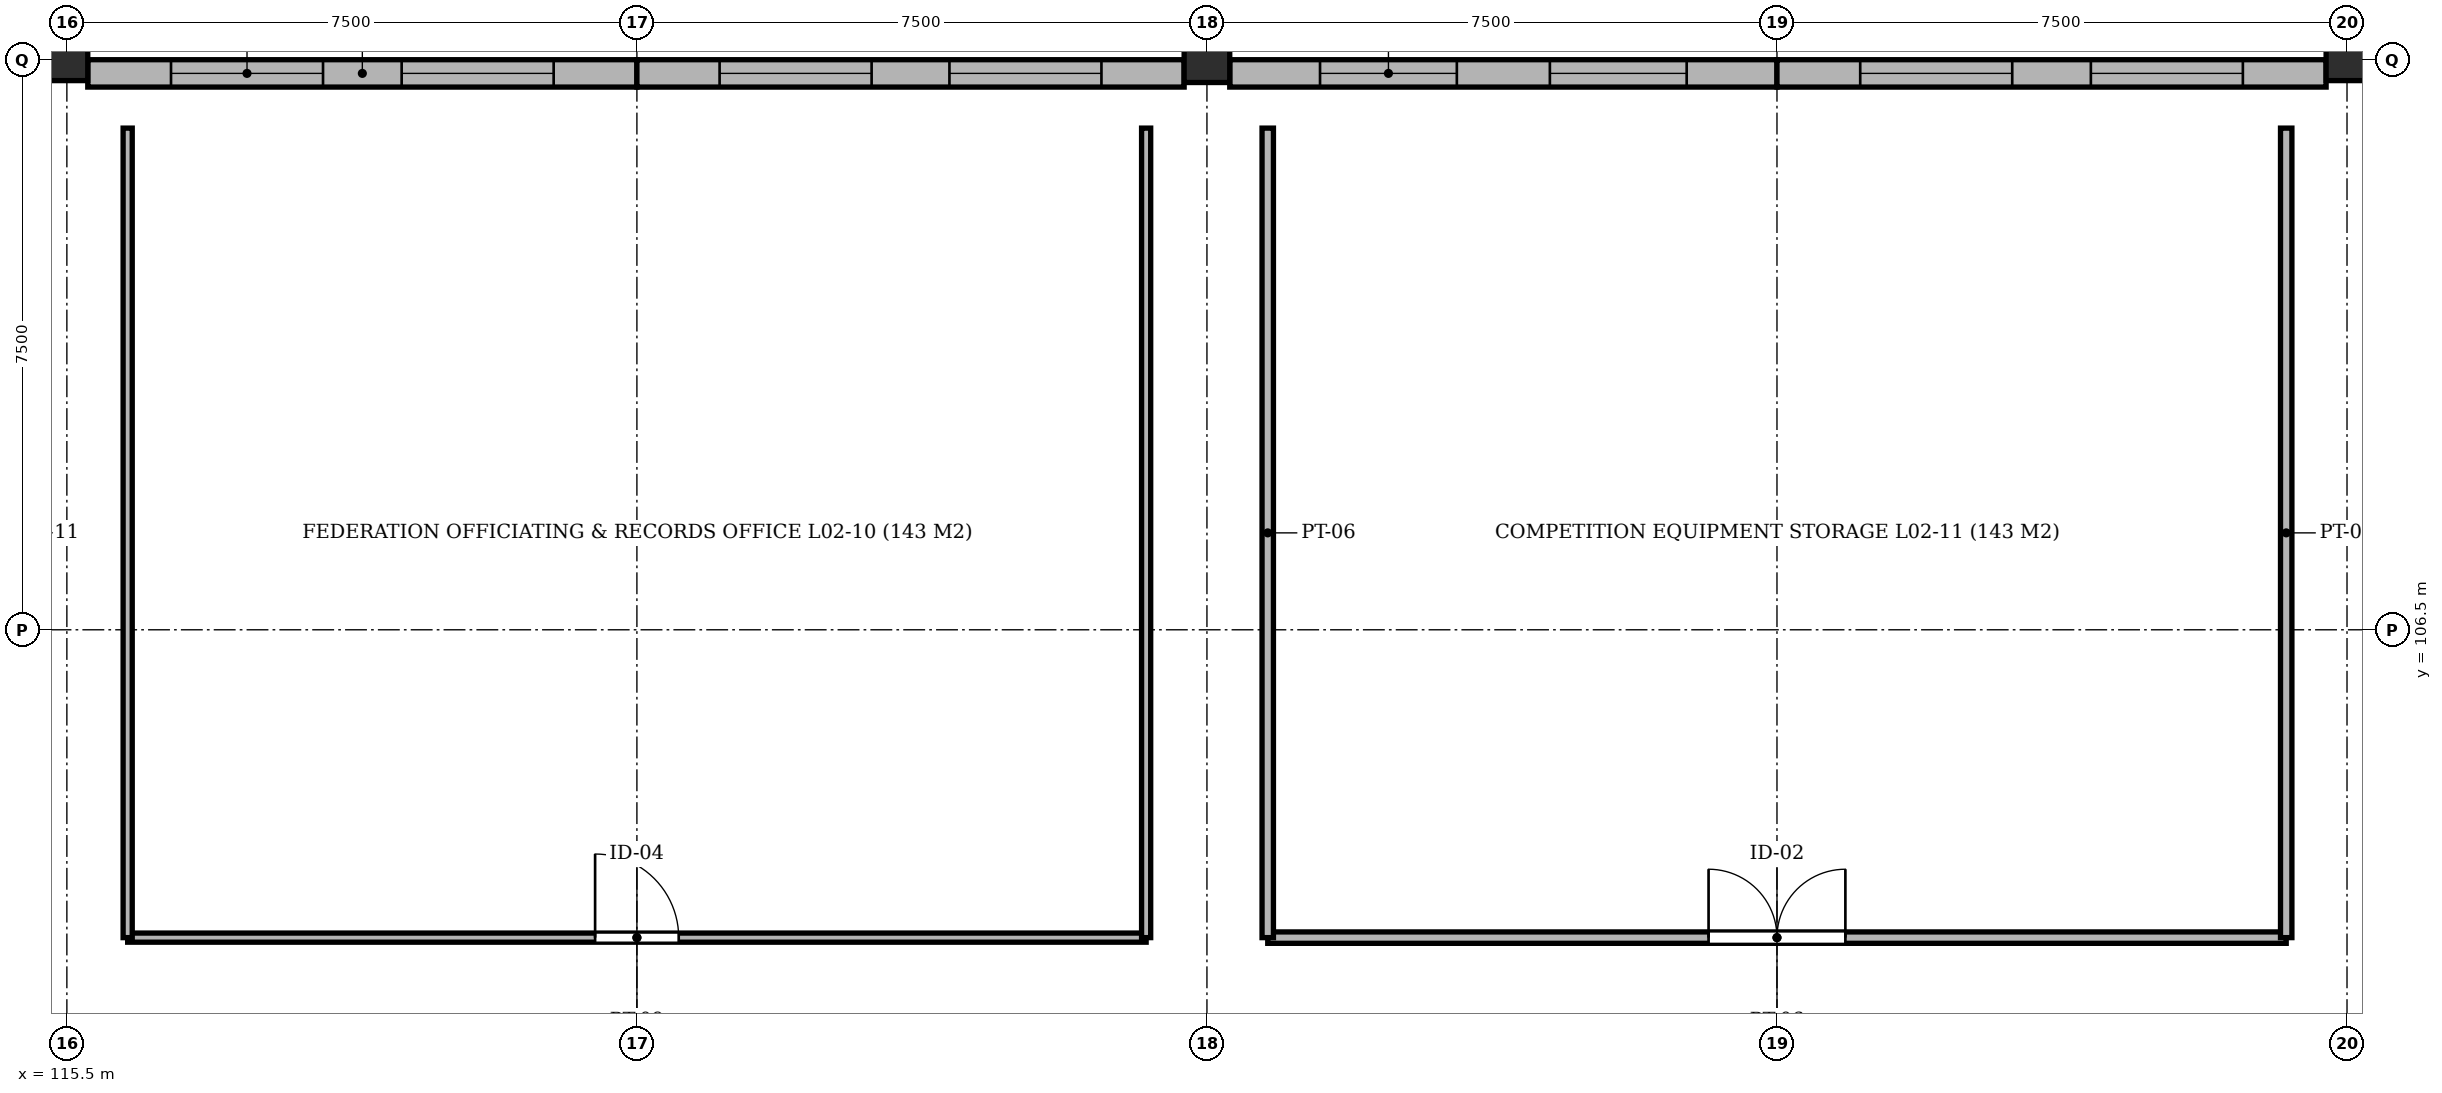
"""IFC4 building model, lengths in metres.
Left out: names, types, materials, properties, quantities, classifications, styles, units other than length and angle.
Written with IfcOpenShell. Run it as: python <this file> out.ifc"""

import sys

from ifc_helpers import new_model, si_unit, direction, frame, frame_2d, origin, origin_2d, place, context, subcontext, project, spatial, rectangle, extrude, element, fill, save


model = new_model("IFC4")
c1 = context("Model", 3, precision=1e-05, world=origin(), true_north=direction((0.0, 1.0)))
c2 = subcontext(c1, "Body", "Model", "MODEL_VIEW")
j1 = project(units=[si_unit("LENGTHUNIT", "METRE"), si_unit("PLANEANGLEUNIT", "RADIAN")], contexts=[c1])
p1 = place(None, origin())
s1 = spatial("IfcSite", under=j1, at=p1, CompositionType="ELEMENT")
p2 = place(p1, origin())
s2 = spatial("IfcBuilding", under=s1, at=p2, CompositionType="ELEMENT")
p3 = place(p2, frame((0.0, 0.0, 9.4)))
s3 = spatial("IfcBuildingStorey", under=s2, at=p3, CompositionType="ELEMENT", Elevation=9.4)
p4 = place(p3, frame((115.5, 114.0, -0.45), z_axis=(0.0, 0.0, 1.0), x_axis=(1.0, 0.0, 0.0)))
e1 = element("IfcColumn", 1, at=p4, inside=s3, PredefinedType="COLUMN", context=c2, shape_type="SweptSolid", body=[
    extrude(rectangle(XDim=0.55, YDim=0.55, at=origin_2d()), origin(), (0.0, 0.0, 1.0), 4.77),
])
p5 = place(p3, frame((130.5, 114.0, -0.45), z_axis=(0.0, 0.0, 1.0), x_axis=(1.0, 0.0, 0.0)))
e2 = element("IfcColumn", 2, at=p5, inside=s3, PredefinedType="COLUMN", context=c2, shape_type="SweptSolid", body=[
    extrude(rectangle(XDim=0.6, YDim=0.6, at=origin_2d()), origin(), (0.0, 0.0, 1.0), 4.77),
])
p6 = place(p3, frame((145.5, 114.0, -0.45), z_axis=(0.0, 0.0, 1.0), x_axis=(1.0, 0.0, 0.0)))
e3 = element("IfcColumn", 3, at=p6, inside=s3, PredefinedType="COLUMN", context=c2, shape_type="SweptSolid", body=[
    extrude(rectangle(XDim=0.55, YDim=0.55, at=origin_2d()), origin(), (0.0, 0.0, 1.0), 4.77),
])
p7 = place(p3, frame((123.0, 113.82, 0.0), z_axis=(0.0, 0.0, 1.0), x_axis=(-1.0, 0.0, 0.0)))
e4 = element("IfcWall", 4, at=p7, inside=s3, PredefinedType="SOLIDWALL", context=c2, shape_type="SweptSolid", body=[
    extrude(rectangle(XDim=7.225, YDim=0.36, at=frame_2d((3.613, 0.0))), origin(), (0.0, 0.0, 1.0), 3.45),
])
p8 = place(p7, frame((4.13, 0.0, 0.92)))
e5 = element("IfcOpeningElement", 5, at=p8, cuts=e4, PredefinedType="OPENING", context=c2, shape_type="SweptSolid", body=[
    extrude(rectangle(XDim=2.0, YDim=2.1, at=frame_2d((1.0, 1.05))), frame((0.0, 0.192, 0.0), z_axis=(0.0, -1.0, 0.0), x_axis=(1.0, 0.0, 0.0)), (0.0, 0.0, 1.0), 0.384),
])
p9 = place(p7, frame((1.095, 0.0, 0.92)))
e6 = element("IfcOpeningElement", 6, at=p9, cuts=e4, PredefinedType="OPENING", context=c2, shape_type="SweptSolid", body=[
    extrude(rectangle(XDim=2.0, YDim=2.1, at=frame_2d((1.0, 1.05))), frame((0.0, 0.192, 0.0), z_axis=(0.0, -1.0, 0.0), x_axis=(1.0, 0.0, 0.0)), (0.0, 0.0, 1.0), 0.384),
])
p10 = place(p3, frame((130.2, 113.82, 0.0), z_axis=(0.0, 0.0, 1.0), x_axis=(-1.0, 0.0, 0.0)))
e7 = element("IfcWall", 7, at=p10, inside=s3, PredefinedType="SOLIDWALL", context=c2, shape_type="SweptSolid", body=[
    extrude(rectangle(XDim=7.2, YDim=0.36, at=frame_2d((3.6, 0.0))), origin(), (0.0, 0.0, 1.0), 3.45),
])
p11 = place(p10, frame((4.112, 0.0, 0.92)))
e8 = element("IfcOpeningElement", 8, at=p11, cuts=e7, PredefinedType="OPENING", context=c2, shape_type="SweptSolid", body=[
    extrude(rectangle(XDim=2.0, YDim=2.1, at=frame_2d((1.0, 1.05))), frame((0.0, 0.192, 0.0), z_axis=(0.0, -1.0, 0.0), x_axis=(1.0, 0.0, 0.0)), (0.0, 0.0, 1.0), 0.384),
])
p12 = place(p10, frame((1.088, 0.0, 0.92)))
e9 = element("IfcOpeningElement", 9, at=p12, cuts=e7, PredefinedType="OPENING", context=c2, shape_type="SweptSolid", body=[
    extrude(rectangle(XDim=2.0, YDim=2.1, at=frame_2d((1.0, 1.05))), frame((0.0, 0.192, 0.0), z_axis=(0.0, -1.0, 0.0), x_axis=(1.0, 0.0, 0.0)), (0.0, 0.0, 1.0), 0.384),
])
p13 = place(p3, frame((138.0, 113.82, 0.0), z_axis=(0.0, 0.0, 1.0), x_axis=(-1.0, 0.0, 0.0)))
e10 = element("IfcWall", 10, at=p13, inside=s3, PredefinedType="SOLIDWALL", context=c2, shape_type="SweptSolid", body=[
    extrude(rectangle(XDim=7.2, YDim=0.36, at=frame_2d((3.6, 0.0))), origin(), (0.0, 0.0, 1.0), 3.45),
])
p14 = place(p13, frame((4.212, 0.0, 0.92)))
e11 = element("IfcOpeningElement", 11, at=p14, cuts=e10, PredefinedType="OPENING", context=c2, shape_type="SweptSolid", body=[
    extrude(rectangle(XDim=1.8, YDim=2.1, at=frame_2d((0.9, 1.05))), frame((0.0, 0.192, 0.0), z_axis=(0.0, -1.0, 0.0), x_axis=(1.0, 0.0, 0.0)), (0.0, 0.0, 1.0), 0.384),
])
p15 = place(p13, frame((1.188, 0.0, 0.92)))
e12 = element("IfcOpeningElement", 12, at=p15, cuts=e10, PredefinedType="OPENING", context=c2, shape_type="SweptSolid", body=[
    extrude(rectangle(XDim=1.8, YDim=2.1, at=frame_2d((0.9, 1.05))), frame((0.0, 0.192, 0.0), z_axis=(0.0, -1.0, 0.0), x_axis=(1.0, 0.0, 0.0)), (0.0, 0.0, 1.0), 0.384),
])
p16 = place(p3, frame((145.225, 113.82, 0.0), z_axis=(0.0, 0.0, 1.0), x_axis=(-1.0, 0.0, 0.0)))
e13 = element("IfcWall", 13, at=p16, inside=s3, PredefinedType="SOLIDWALL", context=c2, shape_type="SweptSolid", body=[
    extrude(rectangle(XDim=7.225, YDim=0.36, at=frame_2d((3.613, 0.0))), origin(), (0.0, 0.0, 1.0), 3.45),
])
p17 = place(p16, frame((4.13, 0.0, 0.92)))
e14 = element("IfcOpeningElement", 14, at=p17, cuts=e13, PredefinedType="OPENING", context=c2, shape_type="SweptSolid", body=[
    extrude(rectangle(XDim=2.0, YDim=2.1, at=frame_2d((1.0, 1.05))), frame((0.0, 0.192, 0.0), z_axis=(0.0, -1.0, 0.0), x_axis=(1.0, 0.0, 0.0)), (0.0, 0.0, 1.0), 0.384),
])
p18 = place(p16, frame((1.095, 0.0, 0.92)))
e15 = element("IfcOpeningElement", 15, at=p18, cuts=e13, PredefinedType="OPENING", context=c2, shape_type="SweptSolid", body=[
    extrude(rectangle(XDim=2.0, YDim=2.1, at=frame_2d((1.0, 1.05))), frame((0.0, 0.192, 0.0), z_axis=(0.0, -1.0, 0.0), x_axis=(1.0, 0.0, 0.0)), (0.0, 0.0, 1.0), 0.384),
])
p19 = place(p3, frame((116.3, 102.45, 0.0), z_axis=(0.0, 0.0, 1.0), x_axis=(1.0, 0.0, 0.0)))
e16 = element("IfcWall", 16, at=p19, inside=s3, PredefinedType="PARTITIONING", context=c2, shape_type="SweptSolid", body=[
    extrude(rectangle(XDim=13.4, YDim=0.12, at=frame_2d((6.7, 0.0))), origin(), (0.0, 0.0, 1.0), 3.88),
])
p20 = place(p19, frame((6.15, 0.0, 0.0)))
e17 = element("IfcOpeningElement", 17, at=p20, cuts=e16, PredefinedType="OPENING", context=c2, shape_type="SweptSolid", body=[
    extrude(rectangle(XDim=1.1, YDim=2.15, at=frame_2d((0.55, 1.075))), frame((0.0, 0.072, 0.0), z_axis=(0.0, -1.0, 0.0), x_axis=(1.0, 0.0, 0.0)), (0.0, 0.0, 1.0), 0.144),
])
for number, where, z_axis, x_axis in (
    (18, (116.3, 102.45, 0.0), (0.0, 0.0, 1.0), (0.0, 1.0, 0.0)),
    (19, (129.7, 102.45, 0.0), (0.0, 0.0, 1.0), (0.0, 1.0, 0.0)),
):
    element("IfcWall", number, at=place(p3, frame(where, z_axis=z_axis, x_axis=x_axis)), inside=s3, PredefinedType="PARTITIONING", context=c2, shape_type="SweptSolid", body=[
        extrude(rectangle(XDim=10.65, YDim=0.12, at=frame_2d((5.325, 0.0))), origin(), (0.0, 0.0, 1.0), 3.88),
    ])
p21 = place(p3, frame((131.3, 102.45, 0.0), z_axis=(0.0, 0.0, 1.0), x_axis=(1.0, 0.0, 0.0)))
e20 = element("IfcWall", 20, at=p21, inside=s3, PredefinedType="PARTITIONING", context=c2, shape_type="SweptSolid", body=[
    extrude(rectangle(XDim=13.4, YDim=0.15, at=frame_2d((6.7, 0.0))), origin(), (0.0, 0.0, 1.0), 3.88),
])
p22 = place(p21, frame((5.8, 0.0, 0.0)))
e21 = element("IfcOpeningElement", 21, at=p22, cuts=e20, PredefinedType="OPENING", context=c2, shape_type="SweptSolid", body=[
    extrude(rectangle(XDim=1.8, YDim=2.25, at=frame_2d((0.9, 1.125))), frame((0.0, 0.087, 0.0), z_axis=(0.0, -1.0, 0.0), x_axis=(1.0, 0.0, 0.0)), (0.0, 0.0, 1.0), 0.174),
])
for number, where, z_axis, x_axis in (
    (22, (131.3, 102.45, 0.0), (0.0, 0.0, 1.0), (0.0, 1.0, 0.0)),
    (23, (144.7, 102.45, 0.0), (0.0, 0.0, 1.0), (0.0, 1.0, 0.0)),
):
    element("IfcWall", number, at=place(p3, frame(where, z_axis=z_axis, x_axis=x_axis)), inside=s3, PredefinedType="PARTITIONING", context=c2, shape_type="SweptSolid", body=[
        extrude(rectangle(XDim=10.65, YDim=0.15, at=frame_2d((5.325, 0.0))), origin(), (0.0, 0.0, 1.0), 3.88),
    ])
p23 = place(p8, origin())
e24 = element("IfcWindow", 24, at=p23, inside=s3, PartitioningType="SINGLE_PANEL", PredefinedType="WINDOW", context=c2, shape_type="SweptSolid", body=[
    extrude(rectangle(XDim=2.0, YDim=2.1, at=frame_2d((1.0, 1.05))), frame((0.0, 0.03, 0.0), z_axis=(0.0, -1.0, 0.0), x_axis=(1.0, 0.0, 0.0)), (0.0, 0.0, 1.0), 0.06),
])
fill(e5, e24)
p24 = place(p9, origin())
e25 = element("IfcWindow", 25, at=p24, inside=s3, PartitioningType="SINGLE_PANEL", PredefinedType="WINDOW", context=c2, shape_type="SweptSolid", body=[
    extrude(rectangle(XDim=2.0, YDim=2.1, at=frame_2d((1.0, 1.05))), frame((0.0, 0.03, 0.0), z_axis=(0.0, -1.0, 0.0), x_axis=(1.0, 0.0, 0.0)), (0.0, 0.0, 1.0), 0.06),
])
fill(e6, e25)
p25 = place(p11, origin())
e26 = element("IfcWindow", 26, at=p25, inside=s3, PartitioningType="SINGLE_PANEL", PredefinedType="WINDOW", context=c2, shape_type="SweptSolid", body=[
    extrude(rectangle(XDim=2.0, YDim=2.1, at=frame_2d((1.0, 1.05))), frame((0.0, 0.03, 0.0), z_axis=(0.0, -1.0, 0.0), x_axis=(1.0, 0.0, 0.0)), (0.0, 0.0, 1.0), 0.06),
])
fill(e8, e26)
p26 = place(p12, origin())
e27 = element("IfcWindow", 27, at=p26, inside=s3, PartitioningType="SINGLE_PANEL", PredefinedType="WINDOW", context=c2, shape_type="SweptSolid", body=[
    extrude(rectangle(XDim=2.0, YDim=2.1, at=frame_2d((1.0, 1.05))), frame((0.0, 0.03, 0.0), z_axis=(0.0, -1.0, 0.0), x_axis=(1.0, 0.0, 0.0)), (0.0, 0.0, 1.0), 0.06),
])
fill(e9, e27)
p27 = place(p14, origin())
e28 = element("IfcWindow", 28, at=p27, inside=s3, PartitioningType="SINGLE_PANEL", PredefinedType="WINDOW", context=c2, shape_type="SweptSolid", body=[
    extrude(rectangle(XDim=1.8, YDim=2.1, at=frame_2d((0.9, 1.05))), frame((0.0, 0.03, 0.0), z_axis=(0.0, -1.0, 0.0), x_axis=(1.0, 0.0, 0.0)), (0.0, 0.0, 1.0), 0.06),
])
fill(e11, e28)
p28 = place(p15, origin())
e29 = element("IfcWindow", 29, at=p28, inside=s3, PartitioningType="SINGLE_PANEL", PredefinedType="WINDOW", context=c2, shape_type="SweptSolid", body=[
    extrude(rectangle(XDim=1.8, YDim=2.1, at=frame_2d((0.9, 1.05))), frame((0.0, 0.03, 0.0), z_axis=(0.0, -1.0, 0.0), x_axis=(1.0, 0.0, 0.0)), (0.0, 0.0, 1.0), 0.06),
])
fill(e12, e29)
p29 = place(p17, origin())
e30 = element("IfcWindow", 30, at=p29, inside=s3, PartitioningType="SINGLE_PANEL", PredefinedType="WINDOW", context=c2, shape_type="SweptSolid", body=[
    extrude(rectangle(XDim=2.0, YDim=2.1, at=frame_2d((1.0, 1.05))), frame((0.0, 0.03, 0.0), z_axis=(0.0, -1.0, 0.0), x_axis=(1.0, 0.0, 0.0)), (0.0, 0.0, 1.0), 0.06),
])
fill(e14, e30)
p30 = place(p18, origin())
e31 = element("IfcWindow", 31, at=p30, inside=s3, PartitioningType="SINGLE_PANEL", PredefinedType="WINDOW", context=c2, shape_type="SweptSolid", body=[
    extrude(rectangle(XDim=2.0, YDim=2.1, at=frame_2d((1.0, 1.05))), frame((0.0, 0.03, 0.0), z_axis=(0.0, -1.0, 0.0), x_axis=(1.0, 0.0, 0.0)), (0.0, 0.0, 1.0), 0.06),
])
fill(e15, e31)
p31 = place(p20, origin())
e32 = element("IfcDoor", 32, at=p31, inside=s3, OperationType="SINGLE_SWING_LEFT", PredefinedType="DOOR", context=c2, shape_type="SweptSolid", body=[
    extrude(rectangle(XDim=1.1, YDim=2.15, at=frame_2d((0.55, 1.075))), frame((0.0, 0.025, 0.0), z_axis=(0.0, -1.0, 0.0), x_axis=(1.0, 0.0, 0.0)), (0.0, 0.0, 1.0), 0.05),
])
fill(e17, e32)
p32 = place(p22, origin())
e33 = element("IfcDoor", 33, at=p32, inside=s3, OperationType="DOUBLE_DOOR_SINGLE_SWING", PredefinedType="DOOR", context=c2, shape_type="SweptSolid", body=[
    extrude(rectangle(XDim=1.8, YDim=2.25, at=frame_2d((0.9, 1.125))), frame((0.0, 0.025, 0.0), z_axis=(0.0, -1.0, 0.0), x_axis=(1.0, 0.0, 0.0)), (0.0, 0.0, 1.0), 0.05),
])
fill(e21, e33)
save(model, sys.argv[1])
